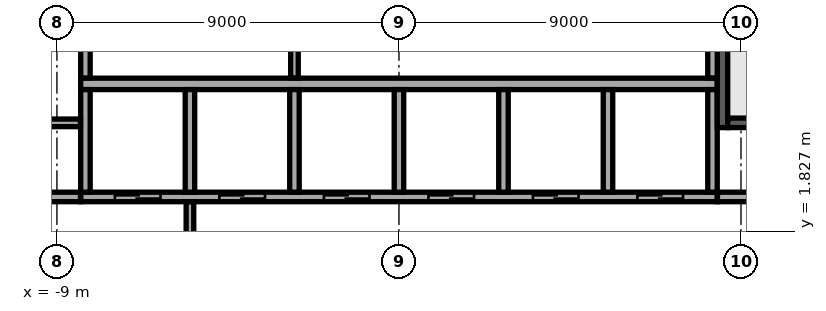
"""IFC4 building model, lengths in metres.
Left out: names, types, materials, properties, quantities, classifications, styles, units other than length and angle.
Written with IfcOpenShell. Run it as: python <this file> out.ifc"""

import sys

from ifc_helpers import new_model, si_unit, direction, frame, frame_2d, origin, place, context, subcontext, project, spatial, rectangle, extrude, element, fill, save


model = new_model("IFC4")
c1 = context("Model", 3, precision=1e-05, world=origin(), true_north=direction((0.0, 1.0)))
c2 = subcontext(c1, "Body", "Model", "MODEL_VIEW")
j1 = project(units=[si_unit("LENGTHUNIT", "METRE"), si_unit("PLANEANGLEUNIT", "RADIAN")], contexts=[c1])
p1 = place(None, origin())
s1 = spatial("IfcSite", under=j1, at=p1, CompositionType="ELEMENT")
p2 = place(p1, origin())
s2 = spatial("IfcBuilding", under=s1, at=p2, CompositionType="ELEMENT")
p3 = place(p2, frame((0.0, 0.0, 155.7)))
s3 = spatial("IfcBuildingStorey", under=s2, at=p3, CompositionType="ELEMENT", Elevation=155.7)
p4 = place(p3, frame((-8.375, 5.7, 0.0), z_axis=(0.0, 0.0, 1.0), x_axis=(1.0, 0.0, 0.0)))
e1 = element("IfcWall", 1, at=p4, inside=s3, PredefinedType="SOLIDWALL", context=c2, shape_type="SweptSolid", body=[
    extrude(rectangle(XDim=16.75, YDim=0.3, at=frame_2d((8.375, 0.0))), origin(), (0.0, 0.0, 1.0), 3.6),
])
p5 = place(p3, frame((-8.375, 2.725, 0.0), z_axis=(0.0, 0.0, 1.0), x_axis=(1.0, 0.0, 0.0)))
e2 = element("IfcWall", 2, at=p5, inside=s3, PredefinedType="SOLIDWALL", context=c2, shape_type="SweptSolid", body=[
    extrude(rectangle(XDim=16.75, YDim=0.25, at=frame_2d((8.375, 0.0))), origin(), (0.0, 0.0, 1.0), 3.6),
])
p6 = place(p5, frame((0.9, 0.0, 0.0)))
e3 = element("IfcOpeningElement", 3, at=p6, cuts=e2, PredefinedType="OPENING", context=c2, shape_type="SweptSolid", body=[
    extrude(rectangle(XDim=1.2, YDim=2.1, at=frame_2d((0.6, 1.05))), frame((0.0, 0.135, 0.0), z_axis=(0.0, -1.0, 0.0), x_axis=(1.0, 0.0, 0.0)), (0.0, 0.0, 1.0), 0.27),
])
p7 = place(p5, frame((3.65, 0.0, 0.0)))
e4 = element("IfcOpeningElement", 4, at=p7, cuts=e2, PredefinedType="OPENING", context=c2, shape_type="SweptSolid", body=[
    extrude(rectangle(XDim=1.2, YDim=2.1, at=frame_2d((0.6, 1.05))), frame((0.0, 0.135, 0.0), z_axis=(0.0, -1.0, 0.0), x_axis=(1.0, 0.0, 0.0)), (0.0, 0.0, 1.0), 0.27),
])
p8 = place(p5, frame((6.4, 0.0, 0.0)))
e5 = element("IfcOpeningElement", 5, at=p8, cuts=e2, PredefinedType="OPENING", context=c2, shape_type="SweptSolid", body=[
    extrude(rectangle(XDim=1.2, YDim=2.1, at=frame_2d((0.6, 1.05))), frame((0.0, 0.135, 0.0), z_axis=(0.0, -1.0, 0.0), x_axis=(1.0, 0.0, 0.0)), (0.0, 0.0, 1.0), 0.27),
])
p9 = place(p5, frame((9.15, 0.0, 0.0)))
e6 = element("IfcOpeningElement", 6, at=p9, cuts=e2, PredefinedType="OPENING", context=c2, shape_type="SweptSolid", body=[
    extrude(rectangle(XDim=1.2, YDim=2.1, at=frame_2d((0.6, 1.05))), frame((0.0, 0.135, 0.0), z_axis=(0.0, -1.0, 0.0), x_axis=(1.0, 0.0, 0.0)), (0.0, 0.0, 1.0), 0.27),
])
p10 = place(p5, frame((11.9, 0.0, 0.0)))
e7 = element("IfcOpeningElement", 7, at=p10, cuts=e2, PredefinedType="OPENING", context=c2, shape_type="SweptSolid", body=[
    extrude(rectangle(XDim=1.2, YDim=2.1, at=frame_2d((0.6, 1.05))), frame((0.0, 0.135, 0.0), z_axis=(0.0, -1.0, 0.0), x_axis=(1.0, 0.0, 0.0)), (0.0, 0.0, 1.0), 0.27),
])
p11 = place(p5, frame((14.65, 0.0, 0.0)))
e8 = element("IfcOpeningElement", 8, at=p11, cuts=e2, PredefinedType="OPENING", context=c2, shape_type="SweptSolid", body=[
    extrude(rectangle(XDim=1.2, YDim=2.1, at=frame_2d((0.6, 1.05))), frame((0.0, 0.135, 0.0), z_axis=(0.0, -1.0, 0.0), x_axis=(1.0, 0.0, 0.0)), (0.0, 0.0, 1.0), 0.27),
])
for number, where, z_axis, x_axis in (
    (9, (-8.25, 2.85, 0.0), (0.0, 0.0, 1.0), (0.0, 1.0, 0.0)),
    (10, (-5.5, 2.85, 0.0), (0.0, 0.0, 1.0), (0.0, 1.0, 0.0)),
    (11, (-2.75, 2.85, 0.0), (0.0, 0.0, 1.0), (0.0, 1.0, 0.0)),
    (12, (0.0, 2.85, 0.0), (0.0, 0.0, 1.0), (0.0, 1.0, 0.0)),
    (13, (2.75, 2.85, 0.0), (0.0, 0.0, 1.0), (0.0, 1.0, 0.0)),
    (14, (5.5, 2.85, 0.0), (0.0, 0.0, 1.0), (0.0, 1.0, 0.0)),
    (15, (8.25, 2.85, 0.0), (0.0, 0.0, 1.0), (0.0, 1.0, 0.0)),
):
    element("IfcWall", number, at=place(p3, frame(where, z_axis=z_axis, x_axis=x_axis)), inside=s3, PredefinedType="SOLIDWALL", context=c2, shape_type="SweptSolid", body=[
        extrude(rectangle(XDim=2.7, YDim=0.25, at=frame_2d((1.35, 0.0))), origin(), (0.0, 0.0, 1.0), 3.6),
    ])
p12 = place(p3, frame((8.512, 4.55, 0.0), z_axis=(0.0, 0.0, 1.0), x_axis=(0.0, 1.0, 0.0)))
e16 = element("IfcWall", 16, at=p12, inside=s3, PredefinedType="SOLIDWALL", context=c2, shape_type="SweptSolid", body=[
    extrude(rectangle(XDim=7.25, YDim=0.275, at=frame_2d((3.625, 0.0))), origin(), (0.0, 0.0, 1.0), 3.6),
])
p13 = place(p12, frame((6.0, 0.0, 0.0)))
e17 = element("IfcOpeningElement", 17, at=p13, cuts=e16, PredefinedType="OPENING", context=c2, shape_type="SweptSolid", body=[
    extrude(rectangle(XDim=1.0, YDim=2.1, at=frame_2d((0.5, 1.05))), frame((0.0, 0.147, 0.0), z_axis=(0.0, -1.0, 0.0), x_axis=(1.0, 0.0, 0.0)), (0.0, 0.0, 1.0), 0.295),
])
p14 = place(p3, frame((8.65, 4.675, 0.0), z_axis=(0.0, 0.0, 1.0), x_axis=(1.0, 0.0, 0.0)))
e18 = element("IfcWall", 18, at=p14, inside=s3, PredefinedType="SOLIDWALL", context=c2, shape_type="SweptSolid", body=[
    extrude(rectangle(XDim=3.15, YDim=0.25, at=frame_2d((1.575, 0.0))), origin(), (0.0, 0.0, 1.0), 3.6),
])
p15 = place(p3, frame((-5.5, -2.595, 0.0), z_axis=(0.0, 0.0, 1.0), x_axis=(0.0, 1.0, 0.0)))
e19 = element("IfcWall", 19, at=p15, inside=s3, PredefinedType="PARTITIONING", context=c2, shape_type="SweptSolid", body=[
    extrude(rectangle(XDim=5.19, YDim=0.2, at=frame_2d((2.595, 0.0))), origin(), (0.0, 0.0, 1.0), 3.6),
])
p16 = place(p15, frame((1.395, 0.0, 0.0)))
e20 = element("IfcOpeningElement", 20, at=p16, cuts=e19, PredefinedType="OPENING", context=c2, shape_type="SweptSolid", body=[
    extrude(rectangle(XDim=2.4, YDim=2.4, at=frame_2d((1.2, 1.2))), frame((0.0, 0.11, 0.0), z_axis=(0.0, -1.0, 0.0), x_axis=(1.0, 0.0, 0.0)), (0.0, 0.0, 1.0), 0.22),
])
p17 = place(p3, frame((-11.795, 2.725, 0.0), z_axis=(0.0, 0.0, 1.0), x_axis=(1.0, 0.0, 0.0)))
e21 = element("IfcWall", 21, at=p17, inside=s3, PredefinedType="PARTITIONING", context=c2, shape_type="SweptSolid", body=[
    extrude(rectangle(XDim=3.415, YDim=0.25, at=frame_2d((1.708, 0.0))), origin(), (0.0, 0.0, 1.0), 3.6),
])
p18 = place(p17, frame((1.345, 0.0, 0.0)))
e22 = element("IfcOpeningElement", 22, at=p18, cuts=e21, PredefinedType="OPENING", context=c2, shape_type="SweptSolid", body=[
    extrude(rectangle(XDim=0.9, YDim=2.1, at=frame_2d((0.45, 1.05))), frame((0.0, 0.135, 0.0), z_axis=(0.0, -1.0, 0.0), x_axis=(1.0, 0.0, 0.0)), (0.0, 0.0, 1.0), 0.27),
])
p19 = place(p3, frame((8.38, 2.725, 0.0), z_axis=(0.0, 0.0, 1.0), x_axis=(1.0, 0.0, 0.0)))
e23 = element("IfcWall", 23, at=p19, inside=s3, PredefinedType="PARTITIONING", context=c2, shape_type="SweptSolid", body=[
    extrude(rectangle(XDim=3.415, YDim=0.25, at=frame_2d((1.708, 0.0))), origin(), (0.0, 0.0, 1.0), 3.6),
])
p20 = place(p19, frame((1.17, 0.0, 0.0)))
e24 = element("IfcOpeningElement", 24, at=p20, cuts=e23, PredefinedType="OPENING", context=c2, shape_type="SweptSolid", body=[
    extrude(rectangle(XDim=0.9, YDim=2.1, at=frame_2d((0.45, 1.05))), frame((0.0, 0.135, 0.0), z_axis=(0.0, -1.0, 0.0), x_axis=(1.0, 0.0, 0.0)), (0.0, 0.0, 1.0), 0.27),
])
p21 = place(p3, frame((-11.795, 4.675, 0.0), z_axis=(0.0, 0.0, 1.0), x_axis=(1.0, 0.0, 0.0)))
e25 = element("IfcWall", 25, at=p21, inside=s3, PredefinedType="PARTITIONING", context=c2, shape_type="SweptSolid", body=[
    extrude(rectangle(XDim=3.415, YDim=0.2, at=frame_2d((1.708, 0.0))), origin(), (0.0, 0.0, 1.0), 3.6),
])
p22 = place(p3, frame((-8.25, 5.855, 0.0), z_axis=(0.0, 0.0, 1.0), x_axis=(0.0, 1.0, 0.0)))
e26 = element("IfcWall", 26, at=p22, inside=s3, PredefinedType="PARTITIONING", context=c2, shape_type="SweptSolid", body=[
    extrude(rectangle(XDim=2.69, YDim=0.25, at=frame_2d((1.345, 0.0))), origin(), (0.0, 0.0, 1.0), 3.6),
])
p23 = place(p3, frame((-2.75, 5.855, 0.0), z_axis=(0.0, 0.0, 1.0), x_axis=(0.0, 1.0, 0.0)))
e27 = element("IfcWall", 27, at=p23, inside=s3, PredefinedType="PARTITIONING", context=c2, shape_type="SweptSolid", body=[
    extrude(rectangle(XDim=2.69, YDim=0.2, at=frame_2d((1.345, 0.0))), origin(), (0.0, 0.0, 1.0), 3.6),
])
p24 = place(p3, frame((8.25, 5.855, 0.0), z_axis=(0.0, 0.0, 1.0), x_axis=(0.0, 1.0, 0.0)))
e28 = element("IfcWall", 28, at=p24, inside=s3, PredefinedType="PARTITIONING", context=c2, shape_type="SweptSolid", body=[
    extrude(rectangle(XDim=2.69, YDim=0.25, at=frame_2d((1.345, 0.0))), origin(), (0.0, 0.0, 1.0), 3.6),
])
p25 = place(p3, frame((-25.134, 6.331, 0.0), z_axis=(0.0, 0.0, 1.0), x_axis=(0.838655992286, 0.544661478904, 0.0)))
e29 = element("IfcWall", 29, at=p25, inside=s3, PredefinedType="PARTITIONING", context=c2, shape_type="SweptSolid", body=[
    extrude(rectangle(XDim=35.262, YDim=0.15, at=frame_2d((17.631, 0.0))), origin(), (0.0, 0.0, 1.0), 3.15),
])
p26 = place(p25, frame((0.55, 0.0, 0.0)))
e30 = element("IfcOpeningElement", 30, at=p26, cuts=e29, PredefinedType="OPENING", context=c2, shape_type="SweptSolid", body=[
    extrude(rectangle(XDim=1.0, YDim=2.1, at=frame_2d((0.5, 1.05))), frame((0.0, 0.085, 0.0), z_axis=(0.0, -1.0, 0.0), x_axis=(1.0, 0.0, 0.0)), (0.0, 0.0, 1.0), 0.17),
])
p27 = place(p25, frame((5.989, 0.0, 0.0)))
e31 = element("IfcOpeningElement", 31, at=p27, cuts=e29, PredefinedType="OPENING", context=c2, shape_type="SweptSolid", body=[
    extrude(rectangle(XDim=1.0, YDim=2.1, at=frame_2d((0.5, 1.05))), frame((0.0, 0.085, 0.0), z_axis=(0.0, -1.0, 0.0), x_axis=(1.0, 0.0, 0.0)), (0.0, 0.0, 1.0), 0.17),
])
p28 = place(p25, frame((17.183, 0.0, 0.0)))
e32 = element("IfcOpeningElement", 32, at=p28, cuts=e29, PredefinedType="OPENING", context=c2, shape_type="SweptSolid", body=[
    extrude(rectangle(XDim=1.0, YDim=2.1, at=frame_2d((0.5, 1.05))), frame((0.0, 0.085, 0.0), z_axis=(0.0, -1.0, 0.0), x_axis=(1.0, 0.0, 0.0)), (0.0, 0.0, 1.0), 0.17),
])
p29 = place(p25, frame((25.102, 0.0, 0.0)))
e33 = element("IfcOpeningElement", 33, at=p29, cuts=e29, PredefinedType="OPENING", context=c2, shape_type="SweptSolid", body=[
    extrude(rectangle(XDim=1.0, YDim=2.1, at=frame_2d((0.5, 1.05))), frame((0.0, 0.085, 0.0), z_axis=(0.0, -1.0, 0.0), x_axis=(1.0, 0.0, 0.0)), (0.0, 0.0, 1.0), 0.17),
])
p30 = place(p6, origin())
e34 = element("IfcDoor", 34, at=p30, inside=s3, OperationType="DOUBLE_DOOR_SLIDING", PredefinedType="DOOR", context=c2, shape_type="SweptSolid", body=[
    extrude(rectangle(XDim=1.2, YDim=2.1, at=frame_2d((0.6, 1.05))), frame((0.0, 0.025, 0.0), z_axis=(0.0, -1.0, 0.0), x_axis=(1.0, 0.0, 0.0)), (0.0, 0.0, 1.0), 0.05),
])
fill(e3, e34)
p31 = place(p7, origin())
e35 = element("IfcDoor", 35, at=p31, inside=s3, OperationType="DOUBLE_DOOR_SLIDING", PredefinedType="DOOR", context=c2, shape_type="SweptSolid", body=[
    extrude(rectangle(XDim=1.2, YDim=2.1, at=frame_2d((0.6, 1.05))), frame((0.0, 0.025, 0.0), z_axis=(0.0, -1.0, 0.0), x_axis=(1.0, 0.0, 0.0)), (0.0, 0.0, 1.0), 0.05),
])
fill(e4, e35)
p32 = place(p8, origin())
e36 = element("IfcDoor", 36, at=p32, inside=s3, OperationType="DOUBLE_DOOR_SLIDING", PredefinedType="DOOR", context=c2, shape_type="SweptSolid", body=[
    extrude(rectangle(XDim=1.2, YDim=2.1, at=frame_2d((0.6, 1.05))), frame((0.0, 0.025, 0.0), z_axis=(0.0, -1.0, 0.0), x_axis=(1.0, 0.0, 0.0)), (0.0, 0.0, 1.0), 0.05),
])
fill(e5, e36)
p33 = place(p9, origin())
e37 = element("IfcDoor", 37, at=p33, inside=s3, OperationType="DOUBLE_DOOR_SLIDING", PredefinedType="DOOR", context=c2, shape_type="SweptSolid", body=[
    extrude(rectangle(XDim=1.2, YDim=2.1, at=frame_2d((0.6, 1.05))), frame((0.0, 0.025, 0.0), z_axis=(0.0, -1.0, 0.0), x_axis=(1.0, 0.0, 0.0)), (0.0, 0.0, 1.0), 0.05),
])
fill(e6, e37)
p34 = place(p10, origin())
e38 = element("IfcDoor", 38, at=p34, inside=s3, OperationType="DOUBLE_DOOR_SLIDING", PredefinedType="DOOR", context=c2, shape_type="SweptSolid", body=[
    extrude(rectangle(XDim=1.2, YDim=2.1, at=frame_2d((0.6, 1.05))), frame((0.0, 0.025, 0.0), z_axis=(0.0, -1.0, 0.0), x_axis=(1.0, 0.0, 0.0)), (0.0, 0.0, 1.0), 0.05),
])
fill(e7, e38)
p35 = place(p11, origin())
e39 = element("IfcDoor", 39, at=p35, inside=s3, OperationType="DOUBLE_DOOR_SLIDING", PredefinedType="DOOR", context=c2, shape_type="SweptSolid", body=[
    extrude(rectangle(XDim=1.2, YDim=2.1, at=frame_2d((0.6, 1.05))), frame((0.0, 0.025, 0.0), z_axis=(0.0, -1.0, 0.0), x_axis=(1.0, 0.0, 0.0)), (0.0, 0.0, 1.0), 0.05),
])
fill(e8, e39)
save(model, sys.argv[1])
